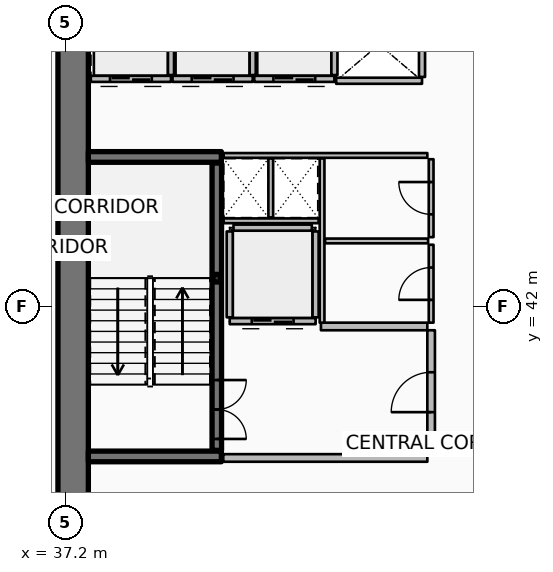
"""IFC4 building model, lengths in metres.
Left out: names, types, materials, properties, quantities, classifications, styles, units other than length and angle.
Written with IfcOpenShell. Run it as: python <this file> out.ifc"""

import sys

from ifc_helpers import new_model, si_unit, direction, frame, frame_2d, origin, origin_2d, place, context, subcontext, project, spatial, rectangle, hollow_rectangle, extrude, element, fill, save


model = new_model("IFC4")
c1 = context("Model", 3, precision=1e-05, world=origin(), true_north=direction((0.0, 1.0)))
c2 = subcontext(c1, "Body", "Model", "MODEL_VIEW")
j1 = project(units=[si_unit("LENGTHUNIT", "METRE"), si_unit("PLANEANGLEUNIT", "RADIAN")], contexts=[c1])
p1 = place(None, origin())
s1 = spatial("IfcSite", under=j1, at=p1, CompositionType="ELEMENT")
p2 = place(p1, origin())
s2 = spatial("IfcBuilding", under=s1, at=p2, CompositionType="ELEMENT")
p3 = place(p2, frame((0.0, 0.0, 154.05)))
s3 = spatial("IfcBuildingStorey", under=s2, at=p3, CompositionType="ELEMENT", Elevation=154.05)
p4 = place(p3, frame((37.4, 34.0, 0.0), z_axis=(0.0, 0.0, 1.0), x_axis=(0.0, 1.0, 0.0)))
e1 = element("IfcWall", 1, at=p4, inside=s3, PredefinedType="SHEAR", context=c2, shape_type="SweptSolid", body=[
    extrude(rectangle(XDim=16.0, YDim=0.8, at=frame_2d((8.0, 0.0))), origin(), (0.0, 0.0, 1.0), 3.75),
])
for number, where, z_axis, x_axis in (
    (2, (37.8, 38.06, 0.0), (0.0, 0.0, 1.0), (1.0, 0.0, 0.0)),
    (3, (37.8, 45.94, 0.0), (0.0, 0.0, 1.0), (1.0, 0.0, 0.0)),
):
    element("IfcWall", number, at=place(p3, frame(where, z_axis=z_axis, x_axis=x_axis)), inside=s3, PredefinedType="SHEAR", context=c2, shape_type="SweptSolid", body=[
        extrude(rectangle(XDim=3.5, YDim=0.28, at=frame_2d((1.75, 0.0))), origin(), (0.0, 0.0, 1.0), 3.75),
    ])
p5 = place(p3, frame((41.18, 42.75, 0.0), z_axis=(0.0, 0.0, 1.0), x_axis=(1.0, 0.0, 0.0)))
e4 = element("IfcColumn", 4, at=p5, inside=s3, PredefinedType="COLUMN", context=c2, shape_type="SweptSolid", body=[
    extrude(hollow_rectangle(XDim=0.2, YDim=0.2, WallThickness=0.01, InnerFilletRadius=0.01, OuterFilletRadius=0.02, at=origin_2d()), origin(), (0.0, 0.0, 1.0), 1.67),
])
p6 = place(p3, frame((41.18, 38.22, 0.0), z_axis=(0.0, 0.0, 1.0), x_axis=(0.0, 1.0, 0.0)))
e5 = element("IfcWall", 5, at=p6, inside=s3, PredefinedType="SOLIDWALL", context=c2, shape_type="SweptSolid", body=[
    extrude(rectangle(XDim=7.56, YDim=0.25, at=frame_2d((3.78, 0.0))), origin(), (0.0, 0.0, 1.0), 3.5),
])
p7 = place(p6, frame((0.3, 0.0, 0.0)))
e6 = element("IfcOpeningElement", 6, at=p7, cuts=e5, PredefinedType="OPENING", context=c2, shape_type="SweptSolid", body=[
    extrude(rectangle(XDim=1.55, YDim=2.15, at=frame_2d((0.775, 1.075))), frame((0.0, 0.135, 0.0), z_axis=(0.0, -1.0, 0.0), x_axis=(1.0, 0.0, 0.0)), (0.0, 0.0, 1.0), 0.27),
])
p8 = place(p3, frame((39.975, 47.995, 0.0), z_axis=(0.0, 0.0, 1.0), x_axis=(-1.0, 0.0, 0.0)))
e7 = element("IfcWall", 7, at=p8, inside=s3, PredefinedType="PARTITIONING", context=c2, shape_type="SweptSolid", body=[
    extrude(rectangle(XDim=2.11, YDim=0.16, at=frame_2d((1.055, 0.0))), origin(), (0.0, 0.0, 1.0), 3.5),
])
p9 = place(p8, frame((0.505, 0.0, 0.0)))
e8 = element("IfcOpeningElement", 8, at=p9, cuts=e7, PredefinedType="OPENING", context=c2, shape_type="SweptSolid", body=[
    extrude(rectangle(XDim=1.1, YDim=2.1, at=frame_2d((0.55, 1.05))), frame((0.0, 0.09, 0.0), z_axis=(0.0, -1.0, 0.0), x_axis=(1.0, 0.0, 0.0)), (0.0, 0.0, 1.0), 0.18),
])
p10 = place(p3, frame((39.975, 48.095, 0.0), z_axis=(0.0, 0.0, 1.0), x_axis=(0.0, 1.0, 0.0)))
e9 = element("IfcWall", 9, at=p10, inside=s3, PredefinedType="PARTITIONING", context=c2, shape_type="SweptSolid", body=[
    extrude(rectangle(XDim=1.61, YDim=0.16, at=frame_2d((0.805, 0.0))), origin(), (0.0, 0.0, 1.0), 3.5),
])
p11 = place(p3, frame((42.125, 47.995, 0.0), z_axis=(0.0, 0.0, 1.0), x_axis=(-1.0, 0.0, 0.0)))
e10 = element("IfcWall", 10, at=p11, inside=s3, PredefinedType="PARTITIONING", context=c2, shape_type="SweptSolid", body=[
    extrude(rectangle(XDim=2.11, YDim=0.16, at=frame_2d((1.055, 0.0))), origin(), (0.0, 0.0, 1.0), 3.5),
])
p12 = place(p11, frame((0.505, 0.0, 0.0)))
e11 = element("IfcOpeningElement", 11, at=p12, cuts=e10, PredefinedType="OPENING", context=c2, shape_type="SweptSolid", body=[
    extrude(rectangle(XDim=1.1, YDim=2.1, at=frame_2d((0.55, 1.05))), frame((0.0, 0.09, 0.0), z_axis=(0.0, -1.0, 0.0), x_axis=(1.0, 0.0, 0.0)), (0.0, 0.0, 1.0), 0.18),
])
p13 = place(p3, frame((42.125, 48.095, 0.0), z_axis=(0.0, 0.0, 1.0), x_axis=(0.0, 1.0, 0.0)))
e12 = element("IfcWall", 12, at=p13, inside=s3, PredefinedType="PARTITIONING", context=c2, shape_type="SweptSolid", body=[
    extrude(rectangle(XDim=1.61, YDim=0.16, at=frame_2d((0.805, 0.0))), origin(), (0.0, 0.0, 1.0), 3.5),
])
p14 = place(p3, frame((44.275, 47.995, 0.0), z_axis=(0.0, 0.0, 1.0), x_axis=(-1.0, 0.0, 0.0)))
e13 = element("IfcWall", 13, at=p14, inside=s3, PredefinedType="PARTITIONING", context=c2, shape_type="SweptSolid", body=[
    extrude(rectangle(XDim=2.11, YDim=0.16, at=frame_2d((1.055, 0.0))), origin(), (0.0, 0.0, 1.0), 3.5),
])
p15 = place(p14, frame((0.505, 0.0, 0.0)))
e14 = element("IfcOpeningElement", 14, at=p15, cuts=e13, PredefinedType="OPENING", context=c2, shape_type="SweptSolid", body=[
    extrude(rectangle(XDim=1.1, YDim=2.1, at=frame_2d((0.55, 1.05))), frame((0.0, 0.09, 0.0), z_axis=(0.0, -1.0, 0.0), x_axis=(1.0, 0.0, 0.0)), (0.0, 0.0, 1.0), 0.18),
])
p16 = place(p3, frame((44.275, 48.095, 0.0), z_axis=(0.0, 0.0, 1.0), x_axis=(0.0, 1.0, 0.0)))
e15 = element("IfcWall", 15, at=p16, inside=s3, PredefinedType="PARTITIONING", context=c2, shape_type="SweptSolid", body=[
    extrude(rectangle(XDim=1.61, YDim=0.16, at=frame_2d((0.805, 0.0))), origin(), (0.0, 0.0, 1.0), 3.5),
])
p17 = place(p3, frame((46.58, 47.945, 0.0), z_axis=(0.0, 0.0, 1.0), x_axis=(-1.0, 0.0, 0.0)))
e16 = element("IfcWall", 16, at=p17, inside=s3, PredefinedType="PARTITIONING", context=c2, shape_type="SweptSolid", body=[
    extrude(rectangle(XDim=2.26, YDim=0.16, at=frame_2d((1.13, 0.0))), origin(), (0.0, 0.0, 1.0), 3.5),
])
p18 = place(p3, frame((46.58, 48.045, 0.0), z_axis=(0.0, 0.0, 1.0), x_axis=(0.0, 1.0, 0.0)))
e17 = element("IfcWall", 17, at=p18, inside=s3, PredefinedType="PARTITIONING", context=c2, shape_type="SweptSolid", body=[
    extrude(rectangle(XDim=1.71, YDim=0.16, at=frame_2d((0.855, 0.0))), origin(), (0.0, 0.0, 1.0), 3.5),
])
p19 = place(p3, frame((43.78, 41.62, 0.0), z_axis=(0.0, 0.0, 1.0), x_axis=(-1.0, 0.0, 0.0)))
e18 = element("IfcWall", 18, at=p19, inside=s3, PredefinedType="PARTITIONING", context=c2, shape_type="SweptSolid", body=[
    extrude(rectangle(XDim=2.26, YDim=0.16, at=frame_2d((1.13, 0.0))), origin(), (0.0, 0.0, 1.0), 3.5),
])
p20 = place(p19, frame((0.58, 0.0, 0.0)))
e19 = element("IfcOpeningElement", 19, at=p20, cuts=e18, PredefinedType="OPENING", context=c2, shape_type="SweptSolid", body=[
    extrude(rectangle(XDim=1.1, YDim=2.1, at=frame_2d((0.55, 1.05))), frame((0.0, 0.09, 0.0), z_axis=(0.0, -1.0, 0.0), x_axis=(1.0, 0.0, 0.0)), (0.0, 0.0, 1.0), 0.18),
])
for number, where, z_axis, x_axis in (
    (20, (43.78, 41.72, 0.0), (0.0, 0.0, 1.0), (0.0, 1.0, 0.0)),
    (21, (41.52, 41.72, 0.0), (0.0, 0.0, 1.0), (0.0, 1.0, 0.0)),
):
    element("IfcWall", number, at=place(p3, frame(where, z_axis=z_axis, x_axis=x_axis)), inside=s3, PredefinedType="PARTITIONING", context=c2, shape_type="SweptSolid", body=[
        extrude(rectangle(XDim=2.26, YDim=0.16, at=frame_2d((1.13, 0.0))), origin(), (0.0, 0.0, 1.0), 3.5),
    ])
p21 = place(p3, frame((41.62, 44.08, 0.0), z_axis=(0.0, 0.0, 1.0), x_axis=(1.0, 0.0, 0.0)))
e22 = element("IfcWall", 22, at=p21, inside=s3, PredefinedType="PARTITIONING", context=c2, shape_type="SweptSolid", body=[
    extrude(rectangle(XDim=2.06, YDim=0.16, at=frame_2d((1.03, 0.0))), origin(), (0.0, 0.0, 1.0), 3.5),
])
p22 = place(p3, frame((41.35, 38.02, 0.0), z_axis=(0.0, 0.0, 1.0), x_axis=(1.0, 0.0, 0.0)))
e23 = element("IfcWall", 23, at=p22, inside=s3, PredefinedType="PARTITIONING", context=c2, shape_type="SweptSolid", body=[
    extrude(rectangle(XDim=5.37, YDim=0.2, at=frame_2d((2.685, 0.0))), origin(), (0.0, 0.0, 1.0), 3.5),
])
p23 = place(p3, frame((43.92, 41.48, 0.0), z_axis=(0.0, 0.0, 1.0), x_axis=(1.0, 0.0, 0.0)))
e24 = element("IfcWall", 24, at=p23, inside=s3, PredefinedType="PARTITIONING", context=c2, shape_type="SweptSolid", body=[
    extrude(rectangle(XDim=2.8, YDim=0.2, at=frame_2d((1.4, 0.0))), origin(), (0.0, 0.0, 1.0), 3.5),
])
p24 = place(p3, frame((46.82, 38.12, 0.0), z_axis=(0.0, 0.0, 1.0), x_axis=(0.0, 1.0, 0.0)))
e25 = element("IfcWall", 25, at=p24, inside=s3, PredefinedType="PARTITIONING", context=c2, shape_type="SweptSolid", body=[
    extrude(rectangle(XDim=3.26, YDim=0.2, at=frame_2d((1.63, 0.0))), origin(), (0.0, 0.0, 1.0), 3.5),
])
p25 = place(p24, frame((1.105, 0.0, 0.0)))
e26 = element("IfcOpeningElement", 26, at=p25, cuts=e25, PredefinedType="OPENING", context=c2, shape_type="SweptSolid", body=[
    extrude(rectangle(XDim=1.05, YDim=2.1, at=frame_2d((0.525, 1.05))), frame((0.0, 0.11, 0.0), z_axis=(0.0, -1.0, 0.0), x_axis=(1.0, 0.0, 0.0)), (0.0, 0.0, 1.0), 0.22),
])
p26 = place(p3, frame((41.36, 45.98, 0.0), z_axis=(0.0, 0.0, 1.0), x_axis=(1.0, 0.0, 0.0)))
e27 = element("IfcWall", 27, at=p26, inside=s3, PredefinedType="PARTITIONING", context=c2, shape_type="SweptSolid", body=[
    extrude(rectangle(XDim=5.36, YDim=0.125, at=frame_2d((2.68, 0.0))), origin(), (0.0, 0.0, 1.0), 2.94),
])
p27 = place(p3, frame((41.36, 44.26, 0.0), z_axis=(0.0, 0.0, 1.0), x_axis=(1.0, 0.0, 0.0)))
e28 = element("IfcWall", 28, at=p27, inside=s3, PredefinedType="PARTITIONING", context=c2, shape_type="SweptSolid", body=[
    extrude(rectangle(XDim=2.5, YDim=0.125, at=frame_2d((1.25, 0.0))), origin(), (0.0, 0.0, 1.0), 2.94),
])
p28 = place(p3, frame((42.6, 44.35, 0.0), z_axis=(0.0, 0.0, 1.0), x_axis=(0.0, 1.0, 0.0)))
e29 = element("IfcWall", 29, at=p28, inside=s3, PredefinedType="PARTITIONING", context=c2, shape_type="SweptSolid", body=[
    extrude(rectangle(XDim=1.55, YDim=0.125, at=frame_2d((0.775, 0.0))), origin(), (0.0, 0.0, 1.0), 2.94),
])
p29 = place(p3, frame((43.95, 41.58, 0.0), z_axis=(0.0, 0.0, 1.0), x_axis=(0.0, 1.0, 0.0)))
e30 = element("IfcWall", 30, at=p29, inside=s3, PredefinedType="PARTITIONING", context=c2, shape_type="SweptSolid", body=[
    extrude(rectangle(XDim=4.32, YDim=0.125, at=frame_2d((2.16, 0.0))), origin(), (0.0, 0.0, 1.0), 2.94),
])
p30 = place(p3, frame((44.03, 43.73, 0.0), z_axis=(0.0, 0.0, 1.0), x_axis=(1.0, 0.0, 0.0)))
e31 = element("IfcWall", 31, at=p30, inside=s3, PredefinedType="PARTITIONING", context=c2, shape_type="SweptSolid", body=[
    extrude(rectangle(XDim=2.71, YDim=0.125, at=frame_2d((1.355, 0.0))), origin(), (0.0, 0.0, 1.0), 2.94),
])
p31 = place(p3, frame((46.82, 41.58, 0.0), z_axis=(0.0, 0.0, 1.0), x_axis=(0.0, 1.0, 0.0)))
e32 = element("IfcWall", 32, at=p31, inside=s3, PredefinedType="PARTITIONING", context=c2, shape_type="SweptSolid", body=[
    extrude(rectangle(XDim=2.05, YDim=0.125, at=frame_2d((1.025, 0.0))), origin(), (0.0, 0.0, 1.0), 2.94),
])
p32 = place(p31, frame((0.6, 0.0, 0.0)))
e33 = element("IfcOpeningElement", 33, at=p32, cuts=e32, PredefinedType="OPENING", context=c2, shape_type="SweptSolid", body=[
    extrude(rectangle(XDim=0.85, YDim=2.06, at=frame_2d((0.425, 1.03))), frame((0.0, 0.073, 0.0), z_axis=(0.0, -1.0, 0.0), x_axis=(1.0, 0.0, 0.0)), (0.0, 0.0, 1.0), 0.145),
])
p33 = place(p3, frame((46.82, 43.83, 0.0), z_axis=(0.0, 0.0, 1.0), x_axis=(0.0, 1.0, 0.0)))
e34 = element("IfcWall", 34, at=p33, inside=s3, PredefinedType="PARTITIONING", context=c2, shape_type="SweptSolid", body=[
    extrude(rectangle(XDim=2.05, YDim=0.125, at=frame_2d((1.025, 0.0))), origin(), (0.0, 0.0, 1.0), 2.94),
])
p34 = place(p33, frame((0.6, 0.0, 0.0)))
e35 = element("IfcOpeningElement", 35, at=p34, cuts=e34, PredefinedType="OPENING", context=c2, shape_type="SweptSolid", body=[
    extrude(rectangle(XDim=0.85, YDim=2.06, at=frame_2d((0.425, 1.03))), frame((0.0, 0.073, 0.0), z_axis=(0.0, -1.0, 0.0), x_axis=(1.0, 0.0, 0.0)), (0.0, 0.0, 1.0), 0.145),
])
p35 = place(p7, origin())
e36 = element("IfcDoor", 36, at=p35, inside=s3, OperationType="DOUBLE_DOOR_SINGLE_SWING", PredefinedType="DOOR", context=c2, shape_type="SweptSolid", body=[
    extrude(rectangle(XDim=1.55, YDim=2.15, at=frame_2d((0.775, 1.075))), frame((0.0, 0.025, 0.0), z_axis=(0.0, -1.0, 0.0), x_axis=(1.0, 0.0, 0.0)), (0.0, 0.0, 1.0), 0.05),
])
fill(e6, e36)
p36 = place(p9, origin())
e37 = element("IfcDoor", 37, at=p36, inside=s3, OperationType="DOUBLE_DOOR_SLIDING", PredefinedType="DOOR", context=c2, shape_type="SweptSolid", body=[
    extrude(rectangle(XDim=1.1, YDim=2.1, at=frame_2d((0.55, 1.05))), frame((0.0, 0.025, 0.0), z_axis=(0.0, -1.0, 0.0), x_axis=(1.0, 0.0, 0.0)), (0.0, 0.0, 1.0), 0.05),
])
fill(e8, e37)
p37 = place(p12, origin())
e38 = element("IfcDoor", 38, at=p37, inside=s3, OperationType="DOUBLE_DOOR_SLIDING", PredefinedType="DOOR", context=c2, shape_type="SweptSolid", body=[
    extrude(rectangle(XDim=1.1, YDim=2.1, at=frame_2d((0.55, 1.05))), frame((0.0, 0.025, 0.0), z_axis=(0.0, -1.0, 0.0), x_axis=(1.0, 0.0, 0.0)), (0.0, 0.0, 1.0), 0.05),
])
fill(e11, e38)
p38 = place(p15, origin())
e39 = element("IfcDoor", 39, at=p38, inside=s3, OperationType="DOUBLE_DOOR_SLIDING", PredefinedType="DOOR", context=c2, shape_type="SweptSolid", body=[
    extrude(rectangle(XDim=1.1, YDim=2.1, at=frame_2d((0.55, 1.05))), frame((0.0, 0.025, 0.0), z_axis=(0.0, -1.0, 0.0), x_axis=(1.0, 0.0, 0.0)), (0.0, 0.0, 1.0), 0.05),
])
fill(e14, e39)
p39 = place(p20, origin())
e40 = element("IfcDoor", 40, at=p39, inside=s3, OperationType="DOUBLE_DOOR_SLIDING", PredefinedType="DOOR", context=c2, shape_type="SweptSolid", body=[
    extrude(rectangle(XDim=1.1, YDim=2.1, at=frame_2d((0.55, 1.05))), frame((0.0, 0.025, 0.0), z_axis=(0.0, -1.0, 0.0), x_axis=(1.0, 0.0, 0.0)), (0.0, 0.0, 1.0), 0.05),
])
fill(e19, e40)
p40 = place(p25, origin())
e41 = element("IfcDoor", 41, at=p40, inside=s3, OperationType="SINGLE_SWING_LEFT", PredefinedType="DOOR", context=c2, shape_type="SweptSolid", body=[
    extrude(rectangle(XDim=1.05, YDim=2.1, at=frame_2d((0.525, 1.05))), frame((0.0, 0.025, 0.0), z_axis=(0.0, -1.0, 0.0), x_axis=(1.0, 0.0, 0.0)), (0.0, 0.0, 1.0), 0.05),
])
fill(e26, e41)
p41 = place(p32, origin())
e42 = element("IfcDoor", 42, at=p41, inside=s3, OperationType="SINGLE_SWING_LEFT", PredefinedType="DOOR", context=c2, shape_type="SweptSolid", body=[
    extrude(rectangle(XDim=0.85, YDim=2.06, at=frame_2d((0.425, 1.03))), frame((0.0, 0.025, 0.0), z_axis=(0.0, -1.0, 0.0), x_axis=(1.0, 0.0, 0.0)), (0.0, 0.0, 1.0), 0.05),
])
fill(e33, e42)
p42 = place(p34, origin())
e43 = element("IfcDoor", 43, at=p42, inside=s3, OperationType="SINGLE_SWING_RIGHT", PredefinedType="DOOR", context=c2, shape_type="SweptSolid", body=[
    extrude(rectangle(XDim=0.85, YDim=2.06, at=frame_2d((0.425, 1.03))), frame((0.0, 0.025, 0.0), z_axis=(0.0, -1.0, 0.0), x_axis=(1.0, 0.0, 0.0)), (0.0, 0.0, 1.0), 0.05),
])
fill(e35, e43)
save(model, sys.argv[1])
